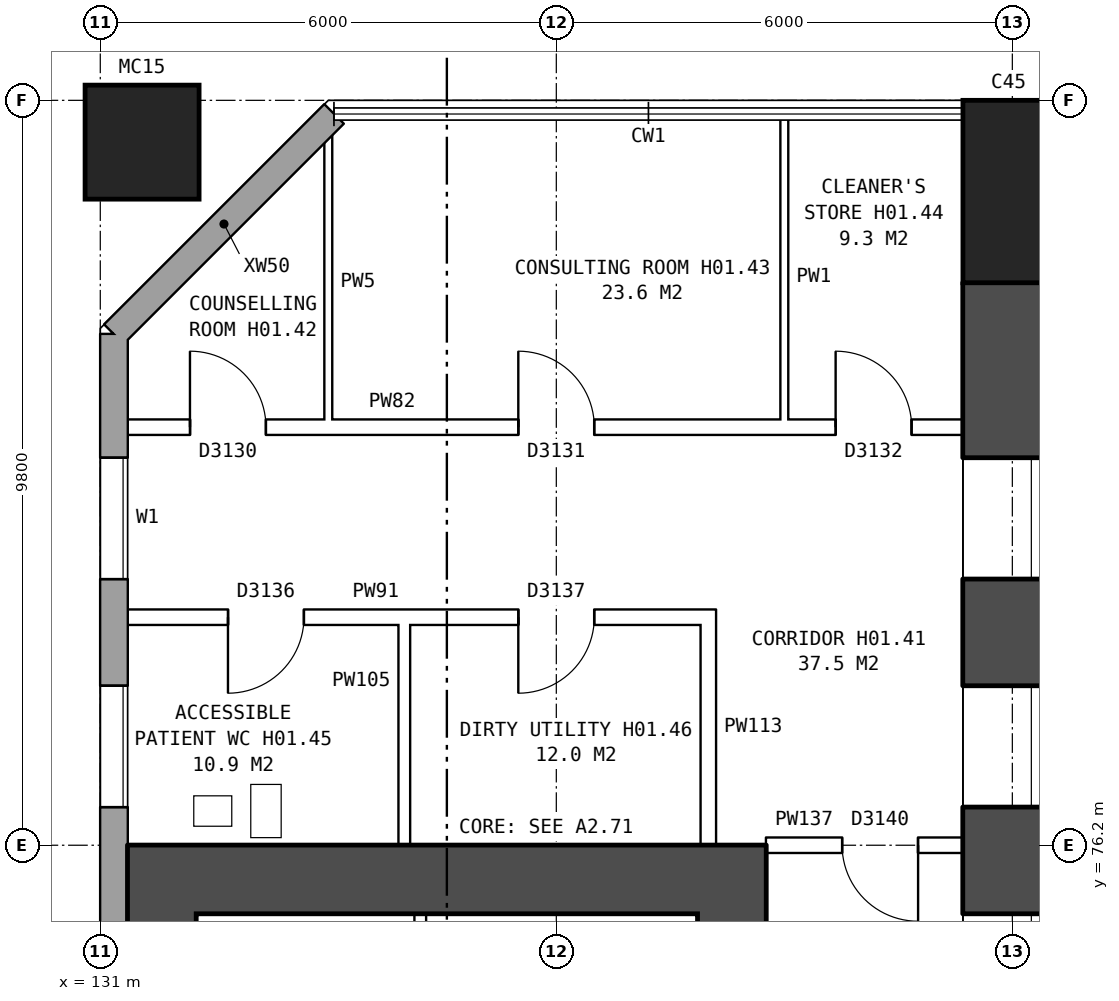
"""IFC4 building model, lengths in metres.
Left out: names, types, materials, properties, quantities, classifications, styles, units other than length and angle.
Written with IfcOpenShell. Run it as: python <this file> out.ifc"""

import sys

from ifc_helpers import new_model, si_unit, direction, frame, frame_2d, origin, origin_2d, place, context, subcontext, project, spatial, rectangle, hollow_rectangle, extrude, element, fill, save


model = new_model("IFC4")
c1 = context("Model", 3, precision=1e-05, world=origin(), true_north=direction((0.0, 1.0)))
c2 = subcontext(c1, "Body", "Model", "MODEL_VIEW")
j1 = project(units=[si_unit("LENGTHUNIT", "METRE"), si_unit("PLANEANGLEUNIT", "RADIAN")], contexts=[c1])
p1 = place(None, origin())
s1 = spatial("IfcSite", under=j1, at=p1, CompositionType="ELEMENT")
p2 = place(p1, origin())
s2 = spatial("IfcBuilding", under=s1, at=p2, CompositionType="ELEMENT")
p3 = place(p2, frame((0.0, 0.0, 5.5)))
s3 = spatial("IfcBuildingStorey", under=s2, at=p3, CompositionType="ELEMENT", Elevation=5.5)
p4 = place(p3, frame((142.95, 84.8, -0.3), z_axis=(0.0, 0.0, 1.0), x_axis=(1.0, 0.0, 0.0)))
e1 = element("IfcColumn", 1, at=p4, inside=s3, PredefinedType="COLUMN", context=c2, shape_type="SweptSolid", body=[
    extrude(rectangle(XDim=1.2, YDim=2.4, at=origin_2d()), origin(), (0.0, 0.0, 1.0), 4.6),
])
p5 = place(p3, frame((142.95, 56.4, -0.3), z_axis=(0.0, 0.0, 1.0), x_axis=(0.0, 1.0, 0.0)))
e2 = element("IfcWall", 2, at=p5, inside=s3, PredefinedType="SHEAR", context=c2, shape_type="SweptSolid", body=[
    extrude(rectangle(XDim=27.2, YDim=1.2, at=frame_2d((13.6, 0.0))), origin(), (0.0, 0.0, 1.0), 4.6),
])
p6 = place(p5, frame((2.3, 0.0, 0.8)))
e3 = element("IfcOpeningElement", 3, at=p6, cuts=e2, PredefinedType="OPENING", context=c2, shape_type="SweptSolid", body=[
    extrude(rectangle(XDim=1.6, YDim=1.8, at=frame_2d((0.8, 0.9))), frame((0.0, 0.61, 0.0), z_axis=(0.0, -1.0, 0.0), x_axis=(1.0, 0.0, 0.0)), (0.0, 0.0, 1.0), 1.22),
])
p7 = place(p5, frame((5.3, 0.0, 0.8)))
e4 = element("IfcOpeningElement", 4, at=p7, cuts=e2, PredefinedType="OPENING", context=c2, shape_type="SweptSolid", body=[
    extrude(rectangle(XDim=1.6, YDim=1.8, at=frame_2d((0.8, 0.9))), frame((0.0, 0.61, 0.0), z_axis=(0.0, -1.0, 0.0), x_axis=(1.0, 0.0, 0.0)), (0.0, 0.0, 1.0), 1.22),
])
p8 = place(p5, frame((8.3, 0.0, 0.8)))
e5 = element("IfcOpeningElement", 5, at=p8, cuts=e2, PredefinedType="OPENING", context=c2, shape_type="SweptSolid", body=[
    extrude(rectangle(XDim=1.6, YDim=1.8, at=frame_2d((0.8, 0.9))), frame((0.0, 0.61, 0.0), z_axis=(0.0, -1.0, 0.0), x_axis=(1.0, 0.0, 0.0)), (0.0, 0.0, 1.0), 1.22),
])
p9 = place(p5, frame((11.3, 0.0, 0.8)))
e6 = element("IfcOpeningElement", 6, at=p9, cuts=e2, PredefinedType="OPENING", context=c2, shape_type="SweptSolid", body=[
    extrude(rectangle(XDim=1.6, YDim=1.8, at=frame_2d((0.8, 0.9))), frame((0.0, 0.61, 0.0), z_axis=(0.0, -1.0, 0.0), x_axis=(1.0, 0.0, 0.0)), (0.0, 0.0, 1.0), 1.22),
])
p10 = place(p5, frame((14.3, 0.0, 0.8)))
e7 = element("IfcOpeningElement", 7, at=p10, cuts=e2, PredefinedType="OPENING", context=c2, shape_type="SweptSolid", body=[
    extrude(rectangle(XDim=1.6, YDim=1.8, at=frame_2d((0.8, 0.9))), frame((0.0, 0.61, 0.0), z_axis=(0.0, -1.0, 0.0), x_axis=(1.0, 0.0, 0.0)), (0.0, 0.0, 1.0), 1.22),
])
p11 = place(p5, frame((17.3, 0.0, 0.8)))
e8 = element("IfcOpeningElement", 8, at=p11, cuts=e2, PredefinedType="OPENING", context=c2, shape_type="SweptSolid", body=[
    extrude(rectangle(XDim=1.6, YDim=1.8, at=frame_2d((0.8, 0.9))), frame((0.0, 0.61, 0.0), z_axis=(0.0, -1.0, 0.0), x_axis=(1.0, 0.0, 0.0)), (0.0, 0.0, 1.0), 1.22),
])
p12 = place(p5, frame((20.3, 0.0, 0.8)))
e9 = element("IfcOpeningElement", 9, at=p12, cuts=e2, PredefinedType="OPENING", context=c2, shape_type="SweptSolid", body=[
    extrude(rectangle(XDim=1.6, YDim=1.8, at=frame_2d((0.8, 0.9))), frame((0.0, 0.61, 0.0), z_axis=(0.0, -1.0, 0.0), x_axis=(1.0, 0.0, 0.0)), (0.0, 0.0, 1.0), 1.22),
])
p13 = place(p5, frame((23.3, 0.0, 0.8)))
e10 = element("IfcOpeningElement", 10, at=p13, cuts=e2, PredefinedType="OPENING", context=c2, shape_type="SweptSolid", body=[
    extrude(rectangle(XDim=1.6, YDim=1.8, at=frame_2d((0.8, 0.9))), frame((0.0, 0.61, 0.0), z_axis=(0.0, -1.0, 0.0), x_axis=(1.0, 0.0, 0.0)), (0.0, 0.0, 1.0), 1.22),
])
p14 = place(p3, frame((131.55, 85.45, 0.0), z_axis=(0.0, 0.0, 1.0), x_axis=(1.0, 0.0, 0.0)))
e11 = element("IfcColumn", 11, at=p14, inside=s3, PredefinedType="COLUMN", context=c2, shape_type="SweptSolid", body=[
    extrude(hollow_rectangle(XDim=1.5, YDim=1.5, WallThickness=0.08, at=origin_2d()), origin(), (0.0, 0.0, 1.0), 4.6),
])
p15 = place(p3, frame((134.075, 85.82, 0.0), z_axis=(0.0, 0.0, 1.0), x_axis=(-0.707106781187, -0.707106781187, 0.0)))
e12 = element("IfcWall", 12, at=p15, inside=s3, PredefinedType="STANDARD", context=c2, shape_type="SweptSolid", body=[
    extrude(rectangle(XDim=4.094, YDim=0.36, at=frame_2d((2.047, 0.0))), origin(), (0.0, 0.0, 1.0), 4.3),
])
p16 = place(p3, frame((131.18, 82.925, 0.0), z_axis=(0.0, 0.0, 1.0), x_axis=(0.0, -1.0, 0.0)))
e13 = element("IfcWall", 13, at=p16, inside=s3, PredefinedType="STANDARD", context=c2, shape_type="SweptSolid", body=[
    extrude(rectangle(XDim=25.851, YDim=0.36, at=frame_2d((12.925, 0.0))), origin(), (0.0, 0.0, 1.0), 4.3),
])
p17 = place(p16, frame((1.625, 0.0, 0.8)))
e14 = element("IfcOpeningElement", 14, at=p17, cuts=e13, PredefinedType="OPENING", context=c2, shape_type="SweptSolid", body=[
    extrude(rectangle(XDim=1.6, YDim=1.8, at=frame_2d((0.8, 0.9))), frame((0.0, 0.19, 0.0), z_axis=(0.0, -1.0, 0.0), x_axis=(1.0, 0.0, 0.0)), (0.0, 0.0, 1.0), 0.38),
])
p18 = place(p16, frame((4.625, 0.0, 0.8)))
e15 = element("IfcOpeningElement", 15, at=p18, cuts=e13, PredefinedType="OPENING", context=c2, shape_type="SweptSolid", body=[
    extrude(rectangle(XDim=1.6, YDim=1.8, at=frame_2d((0.8, 0.9))), frame((0.0, 0.19, 0.0), z_axis=(0.0, -1.0, 0.0), x_axis=(1.0, 0.0, 0.0)), (0.0, 0.0, 1.0), 0.38),
])
p19 = place(p16, frame((19.625, 0.0, 0.8)))
e16 = element("IfcOpeningElement", 16, at=p19, cuts=e13, PredefinedType="OPENING", context=c2, shape_type="SweptSolid", body=[
    extrude(rectangle(XDim=1.6, YDim=1.8, at=frame_2d((0.8, 0.9))), frame((0.0, 0.19, 0.0), z_axis=(0.0, -1.0, 0.0), x_axis=(1.0, 0.0, 0.0)), (0.0, 0.0, 1.0), 0.38),
])
p20 = place(p16, frame((22.625, 0.0, 0.8)))
e17 = element("IfcOpeningElement", 17, at=p20, cuts=e13, PredefinedType="OPENING", context=c2, shape_type="SweptSolid", body=[
    extrude(rectangle(XDim=1.6, YDim=1.8, at=frame_2d((0.8, 0.9))), frame((0.0, 0.19, 0.0), z_axis=(0.0, -1.0, 0.0), x_axis=(1.0, 0.0, 0.0)), (0.0, 0.0, 1.0), 0.38),
])
p21 = place(p3, frame((139.31, 64.7, 0.0), z_axis=(0.0, 0.0, 1.0), x_axis=(0.0, 1.0, 0.0)))
e18 = element("IfcWall", 18, at=p21, inside=s3, PredefinedType="SHEAR", context=c2, shape_type="SweptSolid", body=[
    extrude(rectangle(XDim=10.6, YDim=0.9, at=frame_2d((5.3, 0.0))), origin(), (0.0, 0.0, 1.0), 4.3),
])
p22 = place(p21, frame((0.425, 0.0, 0.0)))
e19 = element("IfcOpeningElement", 19, at=p22, cuts=e18, PredefinedType="OPENING", context=c2, shape_type="SweptSolid", body=[
    extrude(rectangle(XDim=1.1, YDim=2.1, at=frame_2d((0.55, 1.05))), frame((0.0, 0.46, 0.0), z_axis=(0.0, -1.0, 0.0), x_axis=(1.0, 0.0, 0.0)), (0.0, 0.0, 1.0), 0.92),
])
p23 = place(p21, frame((9.0, 0.0, 0.0)))
e20 = element("IfcOpeningElement", 20, at=p23, cuts=e18, PredefinedType="OPENING", context=c2, shape_type="SweptSolid", body=[
    extrude(rectangle(XDim=1.1, YDim=2.1, at=frame_2d((0.55, 1.05))), frame((0.0, 0.46, 0.0), z_axis=(0.0, -1.0, 0.0), x_axis=(1.0, 0.0, 0.0)), (0.0, 0.0, 1.0), 0.92),
])
p24 = place(p21, frame((7.225, 0.0, 0.0)))
e21 = element("IfcOpeningElement", 21, at=p24, cuts=e18, PredefinedType="OPENING", context=c2, shape_type="SweptSolid", body=[
    extrude(rectangle(XDim=0.85, YDim=2.1, at=frame_2d((0.425, 1.05))), frame((0.0, 0.46, 0.0), z_axis=(0.0, -1.0, 0.0), x_axis=(1.0, 0.0, 0.0)), (0.0, 0.0, 1.0), 0.92),
])
p25 = place(p3, frame((131.81, 64.7, 0.0), z_axis=(0.0, 0.0, 1.0), x_axis=(0.0, 1.0, 0.0)))
e22 = element("IfcWall", 22, at=p25, inside=s3, PredefinedType="SHEAR", context=c2, shape_type="SweptSolid", body=[
    extrude(rectangle(XDim=10.6, YDim=0.9, at=frame_2d((5.3, 0.0))), origin(), (0.0, 0.0, 1.0), 4.3),
])
p26 = place(p3, frame((139.76, 75.75, 0.0), z_axis=(0.0, 0.0, 1.0), x_axis=(-1.0, 0.0, 0.0)))
e23 = element("IfcWall", 23, at=p26, inside=s3, PredefinedType="SHEAR", context=c2, shape_type="SweptSolid", body=[
    extrude(rectangle(XDim=8.4, YDim=0.9, at=frame_2d((4.2, 0.0))), origin(), (0.0, 0.0, 1.0), 4.3),
])
p27 = place(p3, frame((135.21, 71.45, 0.0), z_axis=(0.0, 0.0, 1.0), x_axis=(0.0, 1.0, 0.0)))
e24 = element("IfcWall", 24, at=p27, inside=s3, PredefinedType="PARTITIONING", context=c2, shape_type="SweptSolid", body=[
    extrude(rectangle(XDim=3.85, YDim=0.15, at=frame_2d((1.925, 0.0))), origin(), (0.0, 0.0, 1.0), 4.3),
])
p28 = place(p27, frame((0.45, 0.0, 0.0)))
e25 = element("IfcOpeningElement", 25, at=p28, cuts=e24, PredefinedType="OPENING", context=c2, shape_type="SweptSolid", body=[
    extrude(rectangle(XDim=1.1, YDim=2.1, at=frame_2d((0.55, 1.05))), frame((0.0, 0.085, 0.0), z_axis=(0.0, -1.0, 0.0), x_axis=(1.0, 0.0, 0.0)), (0.0, 0.0, 1.0), 0.17),
])
p29 = place(p3, frame((139.76, 76.2, 0.0), z_axis=(0.0, 0.0, 1.0), x_axis=(1.0, 0.0, 0.0)))
e26 = element("IfcWall", 26, at=p29, inside=s3, PredefinedType="PARTITIONING", context=c2, shape_type="SweptSolid", body=[
    extrude(rectangle(XDim=2.59, YDim=0.2, at=frame_2d((1.295, 0.0))), origin(), (0.0, 0.0, 1.0), 4.3),
])
p30 = place(p29, frame((1.0, 0.0, 0.0)))
e27 = element("IfcOpeningElement", 27, at=p30, cuts=e26, PredefinedType="OPENING", context=c2, shape_type="SweptSolid", body=[
    extrude(rectangle(XDim=1.0, YDim=2.1, at=frame_2d((0.5, 1.05))), frame((0.0, 0.11, 0.0), z_axis=(0.0, -1.0, 0.0), x_axis=(1.0, 0.0, 0.0)), (0.0, 0.0, 1.0), 0.22),
])
p31 = place(p3, frame((131.24, 79.2, 0.0), z_axis=(0.0, 0.0, 1.0), x_axis=(1.0, 0.0, 0.0)))
e28 = element("IfcWall", 28, at=p31, inside=s3, PredefinedType="PARTITIONING", context=c2, shape_type="SweptSolid", body=[
    extrude(rectangle(XDim=7.86, YDim=0.2, at=frame_2d((3.93, 0.0))), origin(), (0.0, 0.0, 1.0), 4.3),
])
p32 = place(p31, frame((1.44, 0.0, 0.0)))
e29 = element("IfcOpeningElement", 29, at=p32, cuts=e28, PredefinedType="OPENING", context=c2, shape_type="SweptSolid", body=[
    extrude(rectangle(XDim=1.0, YDim=2.1, at=frame_2d((0.5, 1.05))), frame((0.0, 0.11, 0.0), z_axis=(0.0, -1.0, 0.0), x_axis=(1.0, 0.0, 0.0)), (0.0, 0.0, 1.0), 0.22),
])
p33 = place(p31, frame((5.26, 0.0, 0.0)))
e30 = element("IfcOpeningElement", 30, at=p33, cuts=e28, PredefinedType="OPENING", context=c2, shape_type="SweptSolid", body=[
    extrude(rectangle(XDim=1.0, YDim=2.1, at=frame_2d((0.5, 1.05))), frame((0.0, 0.11, 0.0), z_axis=(0.0, -1.0, 0.0), x_axis=(1.0, 0.0, 0.0)), (0.0, 0.0, 1.0), 0.22),
])
p34 = place(p3, frame((131.24, 81.7, 0.0), z_axis=(0.0, 0.0, 1.0), x_axis=(1.0, 0.0, 0.0)))
e31 = element("IfcWall", 31, at=p34, inside=s3, PredefinedType="PARTITIONING", context=c2, shape_type="SweptSolid", body=[
    extrude(rectangle(XDim=11.23, YDim=0.2, at=frame_2d((5.615, 0.0))), origin(), (0.0, 0.0, 1.0), 4.3),
])
p35 = place(p34, frame((0.94, 0.0, 0.0)))
e32 = element("IfcOpeningElement", 32, at=p35, cuts=e31, PredefinedType="OPENING", context=c2, shape_type="SweptSolid", body=[
    extrude(rectangle(XDim=1.0, YDim=2.1, at=frame_2d((0.5, 1.05))), frame((0.0, 0.11, 0.0), z_axis=(0.0, -1.0, 0.0), x_axis=(1.0, 0.0, 0.0)), (0.0, 0.0, 1.0), 0.22),
])
p36 = place(p34, frame((5.26, 0.0, 0.0)))
e33 = element("IfcOpeningElement", 33, at=p36, cuts=e31, PredefinedType="OPENING", context=c2, shape_type="SweptSolid", body=[
    extrude(rectangle(XDim=1.0, YDim=2.1, at=frame_2d((0.5, 1.05))), frame((0.0, 0.11, 0.0), z_axis=(0.0, -1.0, 0.0), x_axis=(1.0, 0.0, 0.0)), (0.0, 0.0, 1.0), 0.22),
])
p37 = place(p34, frame((9.435, 0.0, 0.0)))
e34 = element("IfcOpeningElement", 34, at=p37, cuts=e31, PredefinedType="OPENING", context=c2, shape_type="SweptSolid", body=[
    extrude(rectangle(XDim=1.0, YDim=2.1, at=frame_2d((0.5, 1.05))), frame((0.0, 0.11, 0.0), z_axis=(0.0, -1.0, 0.0), x_axis=(1.0, 0.0, 0.0)), (0.0, 0.0, 1.0), 0.22),
])
p38 = place(p3, frame((134.0, 81.6, 0.0), z_axis=(0.0, 0.0, 1.0), x_axis=(0.0, 1.0, 0.0)))
e35 = element("IfcWall", 35, at=p38, inside=s3, PredefinedType="PARTITIONING", context=c2, shape_type="SweptSolid", body=[
    extrude(rectangle(XDim=4.011, YDim=0.1, at=frame_2d((2.005, 0.0))), origin(), (0.0, 0.0, 1.0), 4.3),
])
p39 = place(p3, frame((135.0, 76.2, 0.0), z_axis=(0.0, 0.0, 1.0), x_axis=(0.0, 1.0, 0.0)))
e36 = element("IfcWall", 36, at=p39, inside=s3, PredefinedType="PLUMBINGWALL", context=c2, shape_type="SweptSolid", body=[
    extrude(rectangle(XDim=3.1, YDim=0.15, at=frame_2d((1.55, 0.0))), origin(), (0.0, 0.0, 1.0), 4.3),
])
p40 = place(p3, frame((139.0, 76.2, 0.0), z_axis=(0.0, 0.0, 1.0), x_axis=(0.0, 1.0, 0.0)))
e37 = element("IfcWall", 37, at=p40, inside=s3, PredefinedType="PARTITIONING", context=c2, shape_type="SweptSolid", body=[
    extrude(rectangle(XDim=3.1, YDim=0.2, at=frame_2d((1.55, 0.0))), origin(), (0.0, 0.0, 1.0), 4.3),
])
p41 = place(p3, frame((140.0, 81.6, 0.0), z_axis=(0.0, 0.0, 1.0), x_axis=(0.0, 1.0, 0.0)))
e38 = element("IfcWall", 38, at=p41, inside=s3, PredefinedType="PARTITIONING", context=c2, shape_type="SweptSolid", body=[
    extrude(rectangle(XDim=4.16, YDim=0.1, at=frame_2d((2.08, 0.0))), origin(), (0.0, 0.0, 1.0), 4.3),
])
p42 = place(p17, origin())
e39 = element("IfcWindow", 39, at=p42, inside=s3, PartitioningType="SINGLE_PANEL", PredefinedType="WINDOW", context=c2, shape_type="SweptSolid", body=[
    extrude(rectangle(XDim=1.6, YDim=1.8, at=frame_2d((0.8, 0.9))), frame((0.0, 0.15, 0.0), z_axis=(0.0, -1.0, 0.0), x_axis=(1.0, 0.0, 0.0)), (0.0, 0.0, 1.0), 0.06),
])
fill(e14, e39)
p43 = place(p18, origin())
e40 = element("IfcWindow", 40, at=p43, inside=s3, PartitioningType="SINGLE_PANEL", PredefinedType="WINDOW", context=c2, shape_type="SweptSolid", body=[
    extrude(rectangle(XDim=1.6, YDim=1.8, at=frame_2d((0.8, 0.9))), frame((0.0, 0.15, 0.0), z_axis=(0.0, -1.0, 0.0), x_axis=(1.0, 0.0, 0.0)), (0.0, 0.0, 1.0), 0.06),
])
fill(e15, e40)
p44 = place(p11, origin())
e41 = element("IfcWindow", 41, at=p44, inside=s3, PartitioningType="SINGLE_PANEL", PredefinedType="WINDOW", context=c2, shape_type="SweptSolid", body=[
    extrude(rectangle(XDim=1.6, YDim=1.8, at=frame_2d((0.8, 0.9))), frame((0.0, -0.27, 0.0), z_axis=(0.0, -1.0, 0.0), x_axis=(1.0, 0.0, 0.0)), (0.0, 0.0, 1.0), 0.06),
])
fill(e8, e41)
p45 = place(p12, origin())
e42 = element("IfcWindow", 42, at=p45, inside=s3, PartitioningType="SINGLE_PANEL", PredefinedType="WINDOW", context=c2, shape_type="SweptSolid", body=[
    extrude(rectangle(XDim=1.6, YDim=1.8, at=frame_2d((0.8, 0.9))), frame((0.0, -0.27, 0.0), z_axis=(0.0, -1.0, 0.0), x_axis=(1.0, 0.0, 0.0)), (0.0, 0.0, 1.0), 0.06),
])
fill(e9, e42)
p46 = place(p13, origin())
e43 = element("IfcWindow", 43, at=p46, inside=s3, PartitioningType="SINGLE_PANEL", PredefinedType="WINDOW", context=c2, shape_type="SweptSolid", body=[
    extrude(rectangle(XDim=1.6, YDim=1.8, at=frame_2d((0.8, 0.9))), frame((0.0, -0.27, 0.0), z_axis=(0.0, -1.0, 0.0), x_axis=(1.0, 0.0, 0.0)), (0.0, 0.0, 1.0), 0.06),
])
fill(e10, e43)
p47 = place(p30, frame((1.0, 0.0, 0.0), z_axis=(0.0, 0.0, 1.0), x_axis=(-1.0, 0.0, 0.0)))
e44 = element("IfcDoor", 44, at=p47, inside=s3, OperationType="SINGLE_SWING_LEFT", PredefinedType="DOOR", context=c2, shape_type="SweptSolid", body=[
    extrude(rectangle(XDim=1.0, YDim=2.1, at=frame_2d((0.5, 1.05))), frame((0.0, 0.025, 0.0), z_axis=(0.0, -1.0, 0.0), x_axis=(1.0, 0.0, 0.0)), (0.0, 0.0, 1.0), 0.05),
])
fill(e27, e44)
p48 = place(p32, frame((1.0, 0.0, 0.0), z_axis=(0.0, 0.0, 1.0), x_axis=(-1.0, 0.0, 0.0)))
e45 = element("IfcDoor", 45, at=p48, inside=s3, OperationType="SINGLE_SWING_RIGHT", PredefinedType="DOOR", context=c2, shape_type="SweptSolid", body=[
    extrude(rectangle(XDim=1.0, YDim=2.1, at=frame_2d((0.5, 1.05))), frame((0.0, 0.025, 0.0), z_axis=(0.0, -1.0, 0.0), x_axis=(1.0, 0.0, 0.0)), (0.0, 0.0, 1.0), 0.05),
])
fill(e29, e45)
p49 = place(p33, frame((1.0, 0.0, 0.0), z_axis=(0.0, 0.0, 1.0), x_axis=(-1.0, 0.0, 0.0)))
e46 = element("IfcDoor", 46, at=p49, inside=s3, OperationType="SINGLE_SWING_RIGHT", PredefinedType="DOOR", context=c2, shape_type="SweptSolid", body=[
    extrude(rectangle(XDim=1.0, YDim=2.1, at=frame_2d((0.5, 1.05))), frame((0.0, 0.025, 0.0), z_axis=(0.0, -1.0, 0.0), x_axis=(1.0, 0.0, 0.0)), (0.0, 0.0, 1.0), 0.05),
])
fill(e30, e46)
p50 = place(p35, origin())
e47 = element("IfcDoor", 47, at=p50, inside=s3, OperationType="SINGLE_SWING_LEFT", PredefinedType="DOOR", context=c2, shape_type="SweptSolid", body=[
    extrude(rectangle(XDim=1.0, YDim=2.1, at=frame_2d((0.5, 1.05))), frame((0.0, 0.025, 0.0), z_axis=(0.0, -1.0, 0.0), x_axis=(1.0, 0.0, 0.0)), (0.0, 0.0, 1.0), 0.05),
])
fill(e32, e47)
p51 = place(p36, origin())
e48 = element("IfcDoor", 48, at=p51, inside=s3, OperationType="SINGLE_SWING_LEFT", PredefinedType="DOOR", context=c2, shape_type="SweptSolid", body=[
    extrude(rectangle(XDim=1.0, YDim=2.1, at=frame_2d((0.5, 1.05))), frame((0.0, 0.025, 0.0), z_axis=(0.0, -1.0, 0.0), x_axis=(1.0, 0.0, 0.0)), (0.0, 0.0, 1.0), 0.05),
])
fill(e33, e48)
p52 = place(p37, origin())
e49 = element("IfcDoor", 49, at=p52, inside=s3, OperationType="SINGLE_SWING_LEFT", PredefinedType="DOOR", context=c2, shape_type="SweptSolid", body=[
    extrude(rectangle(XDim=1.0, YDim=2.1, at=frame_2d((0.5, 1.05))), frame((0.0, 0.025, 0.0), z_axis=(0.0, -1.0, 0.0), x_axis=(1.0, 0.0, 0.0)), (0.0, 0.0, 1.0), 0.05),
])
fill(e34, e49)
save(model, sys.argv[1])
